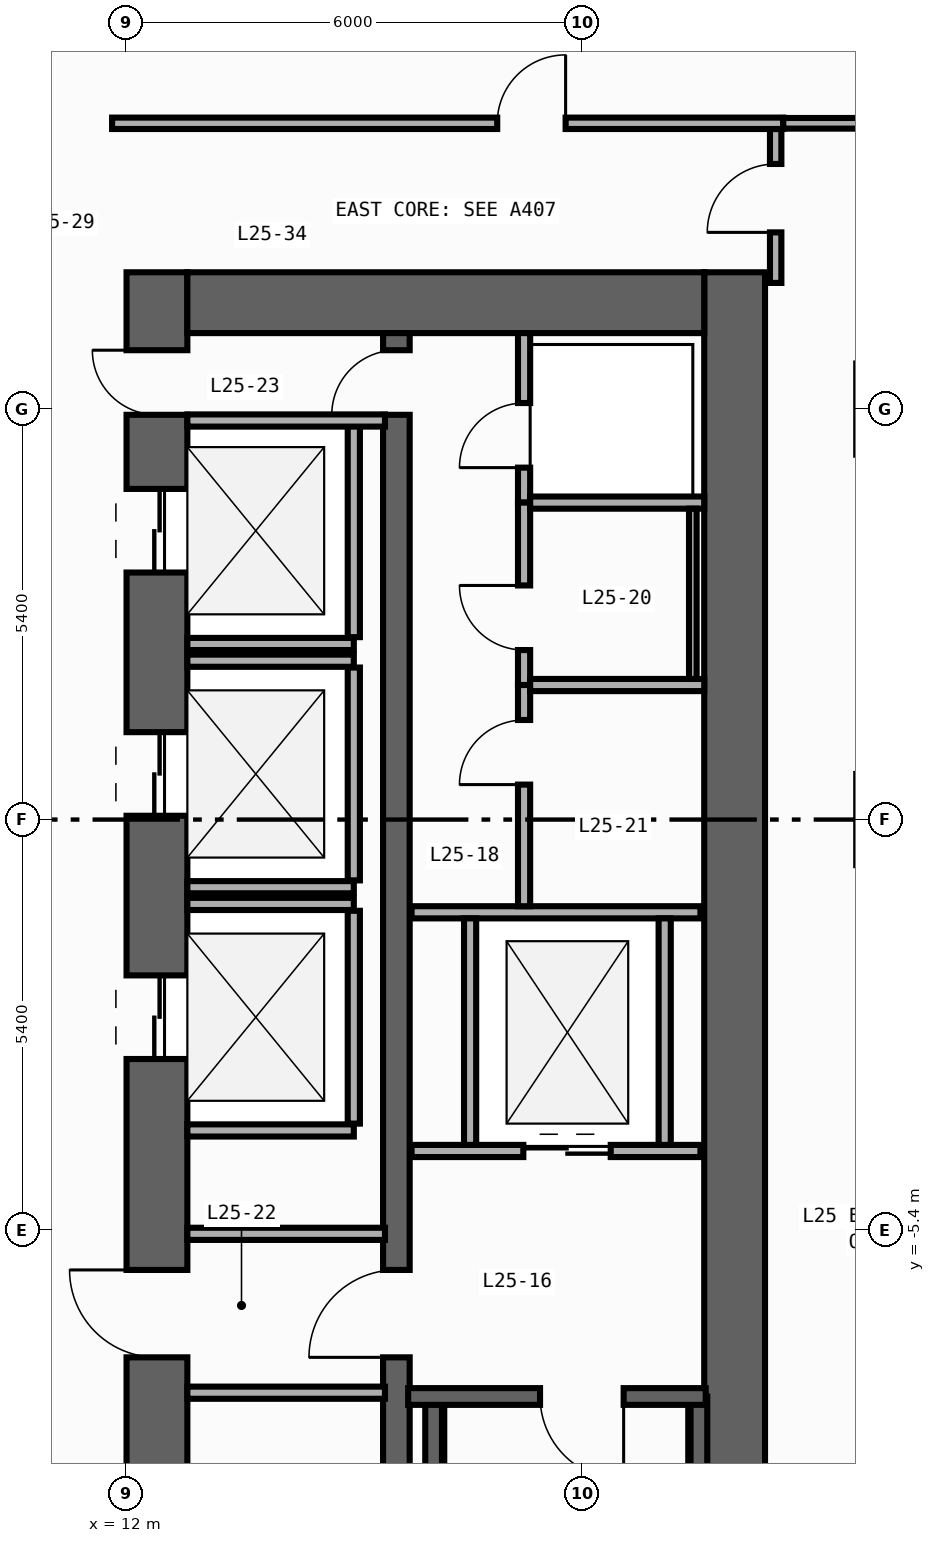
"""IFC4 building model, lengths in metres.
Left out: names, types, materials, properties, quantities, classifications, styles, units other than length and angle.
Written with IfcOpenShell. Run it as: python <this file> out.ifc"""

import sys

from ifc_helpers import new_model, si_unit, direction, frame, frame_2d, origin, origin_2d, place, context, subcontext, project, spatial, rectangle, extrude, element, fill, save


model = new_model("IFC4")
c1 = context("Model", 3, precision=1e-05, world=origin(), true_north=direction((0.0, 1.0)))
c2 = subcontext(c1, "Body", "Model", "MODEL_VIEW")
j1 = project(units=[si_unit("LENGTHUNIT", "METRE"), si_unit("PLANEANGLEUNIT", "RADIAN")], contexts=[c1])
p1 = place(None, origin())
s1 = spatial("IfcSite", under=j1, at=p1, CompositionType="ELEMENT")
p2 = place(p1, origin())
s2 = spatial("IfcBuilding", under=s1, at=p2, CompositionType="ELEMENT")
p3 = place(p2, frame((0.0, 0.0, 110.0)))
s3 = spatial("IfcBuildingStorey", under=s2, at=p3, CompositionType="ELEMENT", Elevation=110.0)
p4 = place(p3, frame((12.4, -19.8, 0.0), z_axis=(0.0, 0.0, 1.0), x_axis=(0.0, 1.0, 0.0)))
e1 = element("IfcWall", 1, at=p4, inside=s3, PredefinedType="SHEAR", context=c2, shape_type="SweptSolid", body=[
    extrude(rectangle(XDim=27.0, YDim=0.8, at=frame_2d((13.5, 0.0))), origin(), (0.0, 0.0, 1.0), 3.94),
])
p5 = place(p4, frame((23.05, 0.0, 0.0)))
e2 = element("IfcOpeningElement", 2, at=p5, cuts=e1, PredefinedType="OPENING", context=c2, shape_type="SweptSolid", body=[
    extrude(rectangle(XDim=1.1, YDim=2.2, at=frame_2d((0.55, 1.1))), frame((0.0, 0.41, 0.0), z_axis=(0.0, -1.0, 0.0), x_axis=(1.0, 0.0, 0.0)), (0.0, 0.0, 1.0), 0.82),
])
p6 = place(p4, frame((19.85, 0.0, 0.0)))
e3 = element("IfcOpeningElement", 3, at=p6, cuts=e1, PredefinedType="OPENING", context=c2, shape_type="SweptSolid", body=[
    extrude(rectangle(XDim=1.1, YDim=2.2, at=frame_2d((0.55, 1.1))), frame((0.0, 0.41, 0.0), z_axis=(0.0, -1.0, 0.0), x_axis=(1.0, 0.0, 0.0)), (0.0, 0.0, 1.0), 0.82),
])
p7 = place(p4, frame((16.65, 0.0, 0.0)))
e4 = element("IfcOpeningElement", 4, at=p7, cuts=e1, PredefinedType="OPENING", context=c2, shape_type="SweptSolid", body=[
    extrude(rectangle(XDim=1.1, YDim=2.2, at=frame_2d((0.55, 1.1))), frame((0.0, 0.41, 0.0), z_axis=(0.0, -1.0, 0.0), x_axis=(1.0, 0.0, 0.0)), (0.0, 0.0, 1.0), 0.82),
])
p8 = place(p4, frame((10.175, 0.0, 0.0)))
e5 = element("IfcOpeningElement", 5, at=p8, cuts=e1, PredefinedType="OPENING", context=c2, shape_type="SweptSolid", body=[
    extrude(rectangle(XDim=0.85, YDim=2.1, at=frame_2d((0.425, 1.05))), frame((0.0, 0.41, 0.0), z_axis=(0.0, -1.0, 0.0), x_axis=(1.0, 0.0, 0.0)), (0.0, 0.0, 1.0), 0.82),
])
p9 = place(p4, frame((12.725, 0.0, 0.0)))
e6 = element("IfcOpeningElement", 6, at=p9, cuts=e1, PredefinedType="OPENING", context=c2, shape_type="SweptSolid", body=[
    extrude(rectangle(XDim=1.15, YDim=2.2, at=frame_2d((0.575, 1.1))), frame((0.0, 0.41, 0.0), z_axis=(0.0, -1.0, 0.0), x_axis=(1.0, 0.0, 0.0)), (0.0, 0.0, 1.0), 0.82),
])
p10 = place(p4, frame((25.125, 0.0, 0.0)))
e7 = element("IfcOpeningElement", 7, at=p10, cuts=e1, PredefinedType="OPENING", context=c2, shape_type="SweptSolid", body=[
    extrude(rectangle(XDim=0.85, YDim=2.1, at=frame_2d((0.425, 1.05))), frame((0.0, 0.41, 0.0), z_axis=(0.0, -1.0, 0.0), x_axis=(1.0, 0.0, 0.0)), (0.0, 0.0, 1.0), 0.82),
])
p11 = place(p3, frame((20.0, -19.8, 0.0), z_axis=(0.0, 0.0, 1.0), x_axis=(0.0, 1.0, 0.0)))
e8 = element("IfcWall", 8, at=p11, inside=s3, PredefinedType="SHEAR", context=c2, shape_type="SweptSolid", body=[
    extrude(rectangle(XDim=27.0, YDim=0.8, at=frame_2d((13.5, 0.0))), origin(), (0.0, 0.0, 1.0), 3.94),
])
p12 = place(p3, frame((12.8, 6.8, 0.0), z_axis=(0.0, 0.0, 1.0), x_axis=(1.0, 0.0, 0.0)))
e9 = element("IfcWall", 9, at=p12, inside=s3, PredefinedType="SHEAR", context=c2, shape_type="SweptSolid", body=[
    extrude(rectangle(XDim=6.8, YDim=0.8, at=frame_2d((3.4, 0.0))), origin(), (0.0, 0.0, 1.0), 3.94),
])
p13 = place(p3, frame((15.55, -19.0, 0.0), z_axis=(0.0, 0.0, 1.0), x_axis=(0.0, 1.0, 0.0)))
e10 = element("IfcWall", 10, at=p13, inside=s3, PredefinedType="SHEAR", context=c2, shape_type="SweptSolid", body=[
    extrude(rectangle(XDim=25.4, YDim=0.35, at=frame_2d((12.7, 0.0))), origin(), (0.0, 0.0, 1.0), 3.94),
])
p14 = place(p13, frame((11.925, 0.0, 0.0)))
e11 = element("IfcOpeningElement", 11, at=p14, cuts=e10, PredefinedType="OPENING", context=c2, shape_type="SweptSolid", body=[
    extrude(rectangle(XDim=1.15, YDim=2.2, at=frame_2d((0.575, 1.1))), frame((0.0, 0.185, 0.0), z_axis=(0.0, -1.0, 0.0), x_axis=(1.0, 0.0, 0.0)), (0.0, 0.0, 1.0), 0.37),
])
p15 = place(p13, frame((24.325, 0.0, 0.0)))
e12 = element("IfcOpeningElement", 12, at=p15, cuts=e10, PredefinedType="OPENING", context=c2, shape_type="SweptSolid", body=[
    extrude(rectangle(XDim=0.85, YDim=2.1, at=frame_2d((0.425, 1.05))), frame((0.0, 0.185, 0.0), z_axis=(0.0, -1.0, 0.0), x_axis=(1.0, 0.0, 0.0)), (0.0, 0.0, 1.0), 0.37),
])
for number, where, z_axis, x_axis in (
    (13, (16.04, -18.89, 0.0), (0.0, 0.0, 1.0), (0.0, 1.0, 0.0)),
    (14, (19.53, -18.89, 0.0), (0.0, 0.0, 1.0), (0.0, 1.0, 0.0)),
):
    element("IfcWall", number, at=place(p3, frame(where, z_axis=z_axis, x_axis=x_axis)), inside=s3, PredefinedType="SHEAR", context=c2, shape_type="SweptSolid", body=[
        extrude(rectangle(XDim=11.3, YDim=0.22, at=frame_2d((5.65, 0.0))), origin(), (0.0, 0.0, 1.0), 3.94),
    ])
p16 = place(p3, frame((19.62, -7.59, 0.0), z_axis=(0.0, 0.0, 1.0), x_axis=(-1.0, 0.0, 0.0)))
e15 = element("IfcWall", 15, at=p16, inside=s3, PredefinedType="SHEAR", context=c2, shape_type="SweptSolid", body=[
    extrude(rectangle(XDim=3.915, YDim=0.22, at=frame_2d((1.958, 0.0))), origin(), (0.0, 0.0, 1.0), 3.94),
])
p17 = place(p16, frame((1.08, 0.0, 0.0)))
e16 = element("IfcOpeningElement", 16, at=p17, cuts=e15, PredefinedType="OPENING", context=c2, shape_type="SweptSolid", body=[
    extrude(rectangle(XDim=1.1, YDim=2.2, at=frame_2d((0.55, 1.1))), frame((0.0, 0.12, 0.0), z_axis=(0.0, -1.0, 0.0), x_axis=(1.0, 0.0, 0.0)), (0.0, 0.0, 1.0), 0.24),
])
for number, where, z_axis, x_axis in (
    (17, (22.2, 0.0, 0.0), (0.0, 0.0, 1.0), (1.0, 0.0, 0.0)),
    (18, (22.2, 5.4, 0.0), (0.0, 0.0, 1.0), (1.0, 0.0, 0.0)),
):
    element("IfcColumn", number, at=place(p3, frame(where, z_axis=z_axis, x_axis=x_axis)), inside=s3, PredefinedType="COLUMN", context=c2, shape_type="SweptSolid", body=[
        extrude(rectangle(XDim=1.2, YDim=1.2, at=origin_2d()), origin(), (0.0, 0.0, 1.0), 4.2),
    ])
p18 = place(p3, frame((12.8, 2.31, 0.0), z_axis=(0.0, 0.0, 1.0), x_axis=(1.0, 0.0, 0.0)))
e19 = element("IfcWall", 19, at=p18, inside=s3, PredefinedType="STANDARD", context=c2, shape_type="SweptSolid", body=[
    extrude(rectangle(XDim=2.19, YDim=0.16, at=frame_2d((1.095, 0.0))), origin(), (0.0, 0.0, 1.0), 3.94),
])
p19 = place(p3, frame((14.99, 2.4, 0.0), z_axis=(0.0, 0.0, 1.0), x_axis=(0.0, 1.0, 0.0)))
e20 = element("IfcWall", 20, at=p19, inside=s3, PredefinedType="STANDARD", context=c2, shape_type="SweptSolid", body=[
    extrude(rectangle(XDim=2.8, YDim=0.16, at=frame_2d((1.4, 0.0))), origin(), (0.0, 0.0, 1.0), 3.94),
])
for number, where, z_axis, x_axis in (
    (21, (12.8, -0.89, 0.0), (0.0, 0.0, 1.0), (1.0, 0.0, 0.0)),
    (22, (12.8, 2.09, 0.0), (0.0, 0.0, 1.0), (1.0, 0.0, 0.0)),
):
    element("IfcWall", number, at=place(p3, frame(where, z_axis=z_axis, x_axis=x_axis)), inside=s3, PredefinedType="STANDARD", context=c2, shape_type="SweptSolid", body=[
        extrude(rectangle(XDim=2.19, YDim=0.16, at=frame_2d((1.095, 0.0))), origin(), (0.0, 0.0, 1.0), 3.94),
    ])
p20 = place(p3, frame((14.99, -0.8, 0.0), z_axis=(0.0, 0.0, 1.0), x_axis=(0.0, 1.0, 0.0)))
e23 = element("IfcWall", 23, at=p20, inside=s3, PredefinedType="STANDARD", context=c2, shape_type="SweptSolid", body=[
    extrude(rectangle(XDim=2.8, YDim=0.16, at=frame_2d((1.4, 0.0))), origin(), (0.0, 0.0, 1.0), 3.94),
])
for number, where, z_axis, x_axis in (
    (24, (12.8, -4.09, 0.0), (0.0, 0.0, 1.0), (1.0, 0.0, 0.0)),
    (25, (12.8, -1.11, 0.0), (0.0, 0.0, 1.0), (1.0, 0.0, 0.0)),
):
    element("IfcWall", number, at=place(p3, frame(where, z_axis=z_axis, x_axis=x_axis)), inside=s3, PredefinedType="STANDARD", context=c2, shape_type="SweptSolid", body=[
        extrude(rectangle(XDim=2.19, YDim=0.16, at=frame_2d((1.095, 0.0))), origin(), (0.0, 0.0, 1.0), 3.94),
    ])
p21 = place(p3, frame((14.99, -4.0, 0.0), z_axis=(0.0, 0.0, 1.0), x_axis=(0.0, 1.0, 0.0)))
e26 = element("IfcWall", 26, at=p21, inside=s3, PredefinedType="STANDARD", context=c2, shape_type="SweptSolid", body=[
    extrude(rectangle(XDim=2.8, YDim=0.16, at=frame_2d((1.4, 0.0))), origin(), (0.0, 0.0, 1.0), 3.94),
])
p22 = place(p3, frame((15.75, -4.36, 0.0), z_axis=(0.0, 0.0, 1.0), x_axis=(1.0, 0.0, 0.0)))
e27 = element("IfcWall", 27, at=p22, inside=s3, PredefinedType="STANDARD", context=c2, shape_type="SweptSolid", body=[
    extrude(rectangle(XDim=3.8, YDim=0.16, at=frame_2d((1.9, 0.0))), origin(), (0.0, 0.0, 1.0), 3.94),
])
p23 = place(p22, frame((1.47, 0.0, 0.0)))
e28 = element("IfcOpeningElement", 28, at=p23, cuts=e27, PredefinedType="OPENING", context=c2, shape_type="SweptSolid", body=[
    extrude(rectangle(XDim=1.15, YDim=2.2, at=frame_2d((0.575, 1.1))), frame((0.0, 0.09, 0.0), z_axis=(0.0, -1.0, 0.0), x_axis=(1.0, 0.0, 0.0)), (0.0, 0.0, 1.0), 0.18),
])
p24 = place(p3, frame((15.75, -1.22, 0.0), z_axis=(0.0, 0.0, 1.0), x_axis=(1.0, 0.0, 0.0)))
e29 = element("IfcWall", 29, at=p24, inside=s3, PredefinedType="STANDARD", context=c2, shape_type="SweptSolid", body=[
    extrude(rectangle(XDim=3.8, YDim=0.16, at=frame_2d((1.9, 0.0))), origin(), (0.0, 0.0, 1.0), 3.94),
])
for number, where, z_axis, x_axis in (
    (30, (16.52, -4.28, 0.0), (0.0, 0.0, 1.0), (0.0, 1.0, 0.0)),
    (31, (19.08, -4.28, 0.0), (0.0, 0.0, 1.0), (0.0, 1.0, 0.0)),
):
    element("IfcWall", number, at=place(p3, frame(where, z_axis=z_axis, x_axis=x_axis)), inside=s3, PredefinedType="STANDARD", context=c2, shape_type="SweptSolid", body=[
        extrude(rectangle(XDim=2.98, YDim=0.16, at=frame_2d((1.49, 0.0))), origin(), (0.0, 0.0, 1.0), 3.94),
    ])
for number, where, z_axis, x_axis in (
    (32, (12.8, -5.45, 0.0), (0.0, 0.0, 1.0), (1.0, 0.0, 0.0)),
    (33, (12.8, -7.54, 0.0), (0.0, 0.0, 1.0), (1.0, 0.0, 0.0)),
    (34, (12.8, 5.25, 0.0), (0.0, 0.0, 1.0), (1.0, 0.0, 0.0)),
):
    element("IfcWall", number, at=place(p3, frame(where, z_axis=z_axis, x_axis=x_axis)), inside=s3, PredefinedType="STANDARD", context=c2, shape_type="SweptSolid", body=[
        extrude(rectangle(XDim=2.6, YDim=0.16, at=frame_2d((1.3, 0.0))), origin(), (0.0, 0.0, 1.0), 3.94),
    ])
p25 = place(p3, frame((17.23, 4.17, 0.0), z_axis=(0.0, 0.0, 1.0), x_axis=(0.0, 1.0, 0.0)))
e35 = element("IfcWall", 35, at=p25, inside=s3, PredefinedType="PARTITIONING", context=c2, shape_type="SweptSolid", body=[
    extrude(rectangle(XDim=2.23, YDim=0.16, at=frame_2d((1.115, 0.0))), origin(), (0.0, 0.0, 1.0), 3.94),
])
p26 = place(p25, frame((0.46, 0.0, 0.0)))
e36 = element("IfcOpeningElement", 36, at=p26, cuts=e35, PredefinedType="OPENING", context=c2, shape_type="SweptSolid", body=[
    extrude(rectangle(XDim=0.85, YDim=2.1, at=frame_2d((0.425, 1.05))), frame((0.0, 0.09, 0.0), z_axis=(0.0, -1.0, 0.0), x_axis=(1.0, 0.0, 0.0)), (0.0, 0.0, 1.0), 0.18),
])
p27 = place(p3, frame((17.23, 1.77, 0.0), z_axis=(0.0, 0.0, 1.0), x_axis=(0.0, 1.0, 0.0)))
e37 = element("IfcWall", 37, at=p27, inside=s3, PredefinedType="PARTITIONING", context=c2, shape_type="SweptSolid", body=[
    extrude(rectangle(XDim=2.4, YDim=0.16, at=frame_2d((1.2, 0.0))), origin(), (0.0, 0.0, 1.0), 3.94),
])
p28 = place(p27, frame((0.46, 0.0, 0.0)))
e38 = element("IfcOpeningElement", 38, at=p28, cuts=e37, PredefinedType="OPENING", context=c2, shape_type="SweptSolid", body=[
    extrude(rectangle(XDim=0.85, YDim=2.1, at=frame_2d((0.425, 1.05))), frame((0.0, 0.09, 0.0), z_axis=(0.0, -1.0, 0.0), x_axis=(1.0, 0.0, 0.0)), (0.0, 0.0, 1.0), 0.18),
])
p29 = place(p3, frame((17.23, -1.14, 0.0), z_axis=(0.0, 0.0, 1.0), x_axis=(0.0, 1.0, 0.0)))
e39 = element("IfcWall", 39, at=p29, inside=s3, PredefinedType="PARTITIONING", context=c2, shape_type="SweptSolid", body=[
    extrude(rectangle(XDim=2.91, YDim=0.16, at=frame_2d((1.455, 0.0))), origin(), (0.0, 0.0, 1.0), 3.94),
])
p30 = place(p29, frame((1.6, 0.0, 0.0)))
e40 = element("IfcOpeningElement", 40, at=p30, cuts=e39, PredefinedType="OPENING", context=c2, shape_type="SweptSolid", body=[
    extrude(rectangle(XDim=0.85, YDim=2.1, at=frame_2d((0.425, 1.05))), frame((0.0, 0.09, 0.0), z_axis=(0.0, -1.0, 0.0), x_axis=(1.0, 0.0, 0.0)), (0.0, 0.0, 1.0), 0.18),
])
for number, where, z_axis, x_axis in (
    (41, (17.31, 4.17, 0.0), (0.0, 0.0, 1.0), (1.0, 0.0, 0.0)),
    (42, (17.31, 1.77, 0.0), (0.0, 0.0, 1.0), (1.0, 0.0, 0.0)),
):
    element("IfcWall", number, at=place(p3, frame(where, z_axis=z_axis, x_axis=x_axis)), inside=s3, PredefinedType="PARTITIONING", context=c2, shape_type="SweptSolid", body=[
        extrude(rectangle(XDim=2.29, YDim=0.16, at=frame_2d((1.145, 0.0))), origin(), (0.0, 0.0, 1.0), 3.94),
    ])
p31 = place(p3, frame((20.54, 7.06, 0.0), z_axis=(0.0, 0.0, 1.0), x_axis=(0.0, 1.0, 0.0)))
e43 = element("IfcWall", 43, at=p31, inside=s3, PredefinedType="PARTITIONING", context=c2, shape_type="SweptSolid", body=[
    extrude(rectangle(XDim=2.025, YDim=0.15, at=frame_2d((1.012, 0.0))), origin(), (0.0, 0.0, 1.0), 3.94),
])
p32 = place(p31, frame((0.665, 0.0, 0.0)))
e44 = element("IfcOpeningElement", 44, at=p32, cuts=e43, PredefinedType="OPENING", context=c2, shape_type="SweptSolid", body=[
    extrude(rectangle(XDim=0.9, YDim=2.15, at=frame_2d((0.45, 1.075))), frame((0.0, 0.085, 0.0), z_axis=(0.0, -1.0, 0.0), x_axis=(1.0, 0.0, 0.0)), (0.0, 0.0, 1.0), 0.17),
])
p33 = place(p3, frame((11.81, 9.16, 0.0), z_axis=(0.0, 0.0, 1.0), x_axis=(1.0, 0.0, 0.0)))
e45 = element("IfcWall", 45, at=p33, inside=s3, PredefinedType="PARTITIONING", context=c2, shape_type="SweptSolid", body=[
    extrude(rectangle(XDim=8.83, YDim=0.15, at=frame_2d((4.415, 0.0))), origin(), (0.0, 0.0, 1.0), 3.94),
])
p34 = place(p33, frame((5.067, 0.0, 0.0)))
e46 = element("IfcOpeningElement", 46, at=p34, cuts=e45, PredefinedType="OPENING", context=c2, shape_type="SweptSolid", body=[
    extrude(rectangle(XDim=0.9, YDim=2.15, at=frame_2d((0.45, 1.075))), frame((0.0, 0.085, 0.0), z_axis=(0.0, -1.0, 0.0), x_axis=(1.0, 0.0, 0.0)), (0.0, 0.0, 1.0), 0.17),
])
p35 = place(p3, frame((20.64, 9.16, 0.0), z_axis=(0.0, 0.0, 1.0), x_axis=(1.0, 0.0, 0.0)))
e47 = element("IfcWall", 47, at=p35, inside=s3, PredefinedType="PARTITIONING", context=c2, shape_type="SweptSolid", body=[
    extrude(rectangle(XDim=2.815, YDim=0.14, at=frame_2d((1.408, 0.0))), origin(), (0.0, 0.0, 1.0), 3.94),
])
p36 = place(p3, frame((19.45, 4.09, 0.0), z_axis=(0.0, 0.0, 1.0), x_axis=(0.0, -1.0, 0.0)))
e48 = element("IfcWall", 48, at=p36, inside=s3, PredefinedType="PARTITIONING", context=c2, shape_type="SweptSolid", body=[
    extrude(rectangle(XDim=2.24, YDim=0.1, at=frame_2d((1.12, 0.0))), origin(), (0.0, 0.0, 1.0), 3.94),
])
p37 = place(p17, origin())
e49 = element("IfcDoor", 49, at=p37, inside=s3, OperationType="SINGLE_SWING_LEFT", PredefinedType="DOOR", context=c2, shape_type="SweptSolid", body=[
    extrude(rectangle(XDim=1.1, YDim=2.2, at=frame_2d((0.55, 1.1))), frame((0.0, 0.025, 0.0), z_axis=(0.0, -1.0, 0.0), x_axis=(1.0, 0.0, 0.0)), (0.0, 0.0, 1.0), 0.05),
])
fill(e16, e49)
p38 = place(p5, origin())
e50 = element("IfcDoor", 50, at=p38, inside=s3, OperationType="DOUBLE_DOOR_SLIDING", PredefinedType="DOOR", context=c2, shape_type="SweptSolid", body=[
    extrude(rectangle(XDim=1.1, YDim=2.2, at=frame_2d((0.55, 1.1))), frame((0.0, 0.025, 0.0), z_axis=(0.0, -1.0, 0.0), x_axis=(1.0, 0.0, 0.0)), (0.0, 0.0, 1.0), 0.05),
])
fill(e2, e50)
p39 = place(p6, origin())
e51 = element("IfcDoor", 51, at=p39, inside=s3, OperationType="DOUBLE_DOOR_SLIDING", PredefinedType="DOOR", context=c2, shape_type="SweptSolid", body=[
    extrude(rectangle(XDim=1.1, YDim=2.2, at=frame_2d((0.55, 1.1))), frame((0.0, 0.025, 0.0), z_axis=(0.0, -1.0, 0.0), x_axis=(1.0, 0.0, 0.0)), (0.0, 0.0, 1.0), 0.05),
])
fill(e3, e51)
p40 = place(p7, origin())
e52 = element("IfcDoor", 52, at=p40, inside=s3, OperationType="DOUBLE_DOOR_SLIDING", PredefinedType="DOOR", context=c2, shape_type="SweptSolid", body=[
    extrude(rectangle(XDim=1.1, YDim=2.2, at=frame_2d((0.55, 1.1))), frame((0.0, 0.025, 0.0), z_axis=(0.0, -1.0, 0.0), x_axis=(1.0, 0.0, 0.0)), (0.0, 0.0, 1.0), 0.05),
])
fill(e4, e52)
p41 = place(p9, origin())
e53 = element("IfcDoor", 53, at=p41, inside=s3, OperationType="SINGLE_SWING_RIGHT", PredefinedType="DOOR", context=c2, shape_type="SweptSolid", body=[
    extrude(rectangle(XDim=1.15, YDim=2.2, at=frame_2d((0.575, 1.1))), frame((0.0, 0.025, 0.0), z_axis=(0.0, -1.0, 0.0), x_axis=(1.0, 0.0, 0.0)), (0.0, 0.0, 1.0), 0.05),
])
fill(e6, e53)
p42 = place(p14, origin())
e54 = element("IfcDoor", 54, at=p42, inside=s3, OperationType="SINGLE_SWING_LEFT", PredefinedType="DOOR", context=c2, shape_type="SweptSolid", body=[
    extrude(rectangle(XDim=1.15, YDim=2.2, at=frame_2d((0.575, 1.1))), frame((0.0, 0.025, 0.0), z_axis=(0.0, -1.0, 0.0), x_axis=(1.0, 0.0, 0.0)), (0.0, 0.0, 1.0), 0.05),
])
fill(e11, e54)
p43 = place(p10, origin())
e55 = element("IfcDoor", 55, at=p43, inside=s3, OperationType="SINGLE_SWING_RIGHT", PredefinedType="DOOR", context=c2, shape_type="SweptSolid", body=[
    extrude(rectangle(XDim=0.85, YDim=2.1, at=frame_2d((0.425, 1.05))), frame((0.0, 0.025, 0.0), z_axis=(0.0, -1.0, 0.0), x_axis=(1.0, 0.0, 0.0)), (0.0, 0.0, 1.0), 0.05),
])
fill(e7, e55)
p44 = place(p15, origin())
e56 = element("IfcDoor", 56, at=p44, inside=s3, OperationType="SINGLE_SWING_LEFT", PredefinedType="DOOR", context=c2, shape_type="SweptSolid", body=[
    extrude(rectangle(XDim=0.85, YDim=2.1, at=frame_2d((0.425, 1.05))), frame((0.0, 0.025, 0.0), z_axis=(0.0, -1.0, 0.0), x_axis=(1.0, 0.0, 0.0)), (0.0, 0.0, 1.0), 0.05),
])
fill(e12, e56)
p45 = place(p23, origin())
e57 = element("IfcDoor", 57, at=p45, inside=s3, OperationType="DOUBLE_DOOR_SLIDING", PredefinedType="DOOR", context=c2, shape_type="SweptSolid", body=[
    extrude(rectangle(XDim=1.15, YDim=2.2, at=frame_2d((0.575, 1.1))), frame((0.0, 0.025, 0.0), z_axis=(0.0, -1.0, 0.0), x_axis=(1.0, 0.0, 0.0)), (0.0, 0.0, 1.0), 0.05),
])
fill(e28, e57)
p46 = place(p26, origin())
e58 = element("IfcDoor", 58, at=p46, inside=s3, OperationType="SINGLE_SWING_LEFT", PredefinedType="DOOR", context=c2, shape_type="SweptSolid", body=[
    extrude(rectangle(XDim=0.85, YDim=2.1, at=frame_2d((0.425, 1.05))), frame((0.0, 0.025, 0.0), z_axis=(0.0, -1.0, 0.0), x_axis=(1.0, 0.0, 0.0)), (0.0, 0.0, 1.0), 0.05),
])
fill(e36, e58)
p47 = place(p28, origin())
e59 = element("IfcDoor", 59, at=p47, inside=s3, OperationType="SINGLE_SWING_RIGHT", PredefinedType="DOOR", context=c2, shape_type="SweptSolid", body=[
    extrude(rectangle(XDim=0.85, YDim=2.1, at=frame_2d((0.425, 1.05))), frame((0.0, 0.025, 0.0), z_axis=(0.0, -1.0, 0.0), x_axis=(1.0, 0.0, 0.0)), (0.0, 0.0, 1.0), 0.05),
])
fill(e38, e59)
p48 = place(p30, origin())
e60 = element("IfcDoor", 60, at=p48, inside=s3, OperationType="SINGLE_SWING_LEFT", PredefinedType="DOOR", context=c2, shape_type="SweptSolid", body=[
    extrude(rectangle(XDim=0.85, YDim=2.1, at=frame_2d((0.425, 1.05))), frame((0.0, 0.025, 0.0), z_axis=(0.0, -1.0, 0.0), x_axis=(1.0, 0.0, 0.0)), (0.0, 0.0, 1.0), 0.05),
])
fill(e40, e60)
p49 = place(p32, origin())
e61 = element("IfcDoor", 61, at=p49, inside=s3, OperationType="SINGLE_SWING_LEFT", PredefinedType="DOOR", context=c2, shape_type="SweptSolid", body=[
    extrude(rectangle(XDim=0.9, YDim=2.15, at=frame_2d((0.45, 1.075))), frame((0.0, 0.025, 0.0), z_axis=(0.0, -1.0, 0.0), x_axis=(1.0, 0.0, 0.0)), (0.0, 0.0, 1.0), 0.05),
])
fill(e44, e61)
p50 = place(p34, origin())
e62 = element("IfcDoor", 62, at=p50, inside=s3, OperationType="SINGLE_SWING_RIGHT", PredefinedType="DOOR", context=c2, shape_type="SweptSolid", body=[
    extrude(rectangle(XDim=0.9, YDim=2.15, at=frame_2d((0.45, 1.075))), frame((0.0, 0.025, 0.0), z_axis=(0.0, -1.0, 0.0), x_axis=(1.0, 0.0, 0.0)), (0.0, 0.0, 1.0), 0.05),
])
fill(e46, e62)
save(model, sys.argv[1])
